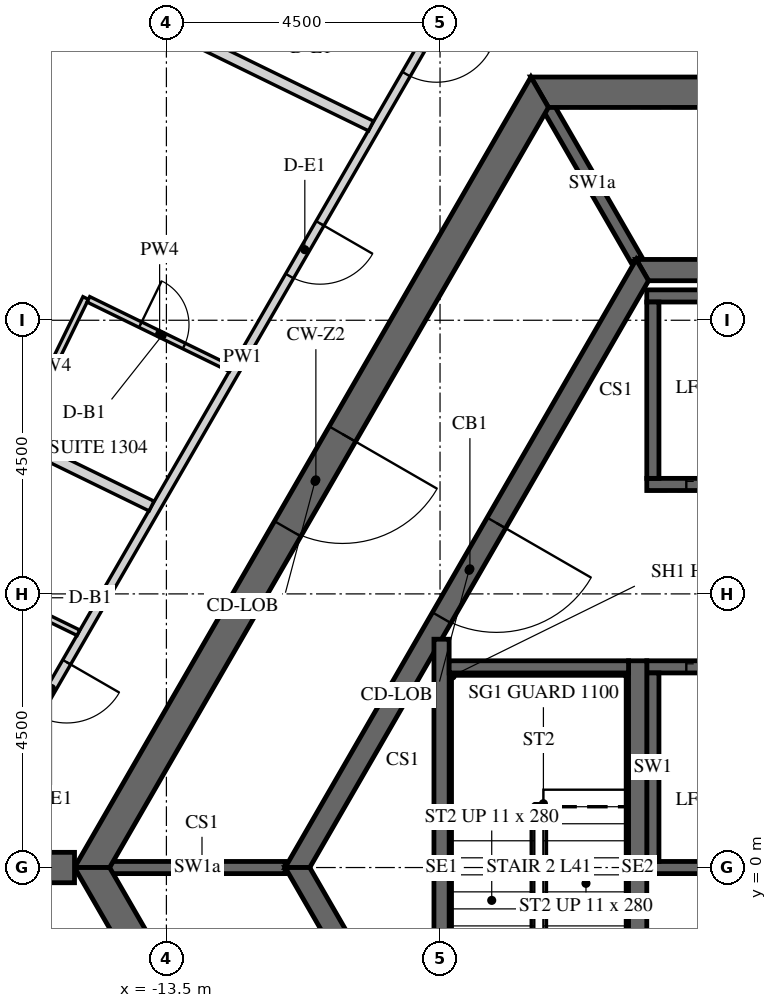
"""IFC4 building model, lengths in metres.
Left out: names, types, materials, properties, quantities, classifications, styles, units other than length and angle.
Written with IfcOpenShell. Run it as: python <this file> out.ifc"""

import sys

from ifc_helpers import new_model, si_unit, direction, frame, frame_2d, origin, place, context, subcontext, project, spatial, polyline, rectangle, outline, extrude, element, fill, save


model = new_model("IFC4")
c1 = context("Model", 3, precision=1e-05, world=origin(), true_north=direction((0.0, 1.0)))
c2 = subcontext(c1, "Body", "Model", "MODEL_VIEW")
j1 = project(units=[si_unit("LENGTHUNIT", "METRE"), si_unit("PLANEANGLEUNIT", "RADIAN")], contexts=[c1])
p1 = place(None, origin())
s1 = spatial("IfcSite", under=j1, at=p1, CompositionType="ELEMENT")
p2 = place(p1, origin())
s2 = spatial("IfcBuilding", under=s1, at=p2, CompositionType="ELEMENT")
p3 = place(p2, frame((0.0, 0.0, 176.1)))
s3 = spatial("IfcBuildingStorey", under=s2, at=p3, CompositionType="ELEMENT", Elevation=176.1)
p4 = place(p3, frame((-7.361, 12.75, -0.15), z_axis=(0.0, 0.0, 1.0), x_axis=(-0.50000571537, -0.866022103989, 0.0)))
e1 = element("IfcWall", 1, at=p4, inside=s3, PredefinedType="SHEAR", context=c2, shape_type="SweptSolid", body=[
    extrude(outline(polyline([(-0.144, -0.25), (14.867, -0.25), (14.578, 0.25), (0.144, 0.25), (-0.144, -0.25)])), origin(), (0.0, 0.0, 1.0), 3.9),
])
p5 = place(p4, frame((6.49, 0.0, 0.15)))
e2 = element("IfcOpeningElement", 2, at=p5, cuts=e1, PredefinedType="OPENING", context=c2, shape_type="SweptSolid", body=[
    extrude(rectangle(XDim=1.8, YDim=2.4, at=frame_2d((0.9, 1.2))), frame((0.0, 0.26, 0.0), z_axis=(0.0, -1.0, 0.0), x_axis=(1.0, 0.0, 0.0)), (0.0, 0.0, 1.0), 0.52),
])
p6 = place(p3, frame((-14.722, 0.0, -0.15), z_axis=(0.0, 0.0, 1.0), x_axis=(0.50000571537, -0.866022103989, 0.0)))
e3 = element("IfcWall", 3, at=p6, inside=s3, PredefinedType="SHEAR", context=c2, shape_type="SweptSolid", body=[
    extrude(outline(polyline([(-0.144, -0.25), (14.867, -0.25), (14.578, 0.25), (0.144, 0.25), (-0.144, -0.25)])), origin(), (0.0, 0.0, 1.0), 3.9),
])
p7 = place(p6, frame((6.432, 0.0, 0.15)))
e4 = element("IfcOpeningElement", 4, at=p7, cuts=e3, PredefinedType="OPENING", context=c2, shape_type="SweptSolid", body=[
    extrude(rectangle(XDim=1.8, YDim=2.4, at=frame_2d((0.9, 1.2))), frame((0.0, 0.26, 0.0), z_axis=(0.0, -1.0, 0.0), x_axis=(1.0, 0.0, 0.0)), (0.0, 0.0, 1.0), 0.52),
])
p8 = place(p3, frame((7.361, 12.75, -0.15), z_axis=(0.0, 0.0, 1.0), x_axis=(-1.0, 0.0, 0.0)))
e5 = element("IfcWall", 5, at=p8, inside=s3, PredefinedType="SHEAR", context=c2, shape_type="SweptSolid", body=[
    extrude(outline(polyline([(-0.144, -0.25), (14.866, -0.25), (14.578, 0.25), (0.144, 0.25), (-0.144, -0.25)])), origin(), (0.0, 0.0, 1.0), 3.9),
])
p9 = place(p8, frame((6.761, 0.0, 0.15)))
e6 = element("IfcOpeningElement", 6, at=p9, cuts=e5, PredefinedType="OPENING", context=c2, shape_type="SweptSolid", body=[
    extrude(rectangle(XDim=1.2, YDim=2.4, at=frame_2d((0.6, 1.2))), frame((0.0, 0.26, 0.0), z_axis=(0.0, -1.0, 0.0), x_axis=(1.0, 0.0, 0.0)), (0.0, 0.0, 1.0), 0.52),
])
p10 = place(p3, frame((-15.011, 0.0, -0.15), z_axis=(0.0, 0.0, 1.0), x_axis=(-1.0, 0.0, 0.0)))
e7 = element("IfcWall", 7, at=p10, inside=s3, PredefinedType="SHEAR", context=c2, shape_type="SweptSolid", body=[
    extrude(rectangle(XDim=15.424, YDim=0.5, at=frame_2d((7.712, 0.0))), origin(), (0.0, 0.0, 1.0), 3.9),
])
p11 = place(p10, frame((6.812, 0.0, 0.15)))
e8 = element("IfcOpeningElement", 8, at=p11, cuts=e7, PredefinedType="OPENING", context=c2, shape_type="SweptSolid", body=[
    extrude(rectangle(XDim=1.8, YDim=2.4, at=frame_2d((0.9, 1.2))), frame((0.0, 0.26, 0.0), z_axis=(0.0, -1.0, 0.0), x_axis=(1.0, 0.0, 0.0)), (0.0, 0.0, 1.0), 0.52),
])
p12 = place(p3, frame((-5.673, 9.825, -0.15), z_axis=(0.0, 0.0, 1.0), x_axis=(-0.499995046907, -0.866028263435, 0.0)))
e9 = element("IfcWall", 9, at=p12, inside=s3, PredefinedType="SHEAR", context=c2, shape_type="SweptSolid", body=[
    extrude(outline(polyline([(-0.101, -0.175), (11.446, -0.175), (11.244, 0.175), (0.101, 0.175), (-0.101, -0.175)])), origin(), (0.0, 0.0, 1.0), 3.9),
])
p13 = place(p12, frame((4.801, 0.0, 0.15)))
e10 = element("IfcOpeningElement", 10, at=p13, cuts=e9, PredefinedType="OPENING", context=c2, shape_type="SweptSolid", body=[
    extrude(rectangle(XDim=1.8, YDim=2.4, at=frame_2d((0.9, 1.2))), frame((0.0, 0.185, 0.0), z_axis=(0.0, -1.0, 0.0), x_axis=(1.0, 0.0, 0.0)), (0.0, 0.0, 1.0), 0.37),
])
p14 = place(p3, frame((-11.345, 0.0, -0.15), z_axis=(0.0, 0.0, 1.0), x_axis=(0.499995046907, -0.866028263435, 0.0)))
e11 = element("IfcWall", 11, at=p14, inside=s3, PredefinedType="SHEAR", context=c2, shape_type="SweptSolid", body=[
    extrude(outline(polyline([(-0.101, -0.175), (11.446, -0.175), (11.244, 0.175), (0.101, 0.175), (-0.101, -0.175)])), origin(), (0.0, 0.0, 1.0), 3.9),
])
p15 = place(p14, frame((4.744, 0.0, 0.15)))
e12 = element("IfcOpeningElement", 12, at=p15, cuts=e11, PredefinedType="OPENING", context=c2, shape_type="SweptSolid", body=[
    extrude(rectangle(XDim=1.8, YDim=2.4, at=frame_2d((0.9, 1.2))), frame((0.0, 0.185, 0.0), z_axis=(0.0, -1.0, 0.0), x_axis=(1.0, 0.0, 0.0)), (0.0, 0.0, 1.0), 0.37),
])
p16 = place(p3, frame((5.673, 9.825, -0.15), z_axis=(0.0, 0.0, 1.0), x_axis=(-1.0, 0.0, 0.0)))
e13 = element("IfcWall", 13, at=p16, inside=s3, PredefinedType="SHEAR", context=c2, shape_type="SweptSolid", body=[
    extrude(outline(polyline([(-0.101, -0.175), (11.446, -0.175), (11.244, 0.175), (0.101, 0.175), (-0.101, -0.175)])), origin(), (0.0, 0.0, 1.0), 3.9),
])
p17 = place(p3, frame((-5.6, 6.3, -0.25), z_axis=(0.0, 0.0, 1.0), x_axis=(1.0, 0.0, 0.0)))
e14 = element("IfcWall", 14, at=p17, inside=s3, PredefinedType="SHEAR", context=c2, shape_type="SweptSolid", body=[
    extrude(rectangle(XDim=11.2, YDim=0.2, at=frame_2d((5.6, 0.0))), origin(), (0.0, 0.0, 1.0), 3.9),
])
p18 = place(p17, frame((8.45, 0.0, 0.25)))
e15 = element("IfcOpeningElement", 15, at=p18, cuts=e14, PredefinedType="OPENING", context=c2, shape_type="SweptSolid", body=[
    extrude(rectangle(XDim=0.9, YDim=2.1, at=frame_2d((0.45, 1.05))), frame((0.0, 0.11, 0.0), z_axis=(0.0, -1.0, 0.0), x_axis=(1.0, 0.0, 0.0)), (0.0, 0.0, 1.0), 0.22),
])
p19 = place(p17, frame((0.65, 0.0, 0.25)))
e16 = element("IfcOpeningElement", 16, at=p19, cuts=e14, PredefinedType="OPENING", context=c2, shape_type="SweptSolid", body=[
    extrude(rectangle(XDim=1.1, YDim=2.1, at=frame_2d((0.55, 1.05))), frame((0.0, 0.11, 0.0), z_axis=(0.0, -1.0, 0.0), x_axis=(1.0, 0.0, 0.0)), (0.0, 0.0, 1.0), 0.22),
])
p20 = place(p17, frame((2.85, 0.0, 0.25)))
e17 = element("IfcOpeningElement", 17, at=p20, cuts=e14, PredefinedType="OPENING", context=c2, shape_type="SweptSolid", body=[
    extrude(rectangle(XDim=1.1, YDim=2.1, at=frame_2d((0.55, 1.05))), frame((0.0, 0.11, 0.0), z_axis=(0.0, -1.0, 0.0), x_axis=(1.0, 0.0, 0.0)), (0.0, 0.0, 1.0), 0.22),
])
p21 = place(p17, frame((5.05, 0.0, 0.25)))
e18 = element("IfcOpeningElement", 18, at=p21, cuts=e14, PredefinedType="OPENING", context=c2, shape_type="SweptSolid", body=[
    extrude(rectangle(XDim=1.1, YDim=2.1, at=frame_2d((0.55, 1.05))), frame((0.0, 0.11, 0.0), z_axis=(0.0, -1.0, 0.0), x_axis=(1.0, 0.0, 0.0)), (0.0, 0.0, 1.0), 0.22),
])
p22 = place(p3, frame((-5.6, 9.4, -0.25), z_axis=(0.0, 0.0, 1.0), x_axis=(1.0, 0.0, 0.0)))
e19 = element("IfcWall", 19, at=p22, inside=s3, PredefinedType="SHEAR", context=c2, shape_type="SweptSolid", body=[
    extrude(rectangle(XDim=11.2, YDim=0.2, at=frame_2d((5.6, 0.0))), origin(), (0.0, 0.0, 1.0), 3.9),
])
p23 = place(p3, frame((-5.5, 6.4, -0.25), z_axis=(0.0, 0.0, 1.0), x_axis=(0.0, 1.0, 0.0)))
e20 = element("IfcWall", 20, at=p23, inside=s3, PredefinedType="SHEAR", context=c2, shape_type="SweptSolid", body=[
    extrude(rectangle(XDim=2.9, YDim=0.2, at=frame_2d((1.45, 0.0))), origin(), (0.0, 0.0, 1.0), 3.9),
])
p24 = place(p3, frame((-5.6, 3.3, -0.25), z_axis=(0.0, 0.0, 1.0), x_axis=(1.0, 0.0, 0.0)))
e21 = element("IfcWall", 21, at=p24, inside=s3, PredefinedType="SHEAR", context=c2, shape_type="SweptSolid", body=[
    extrude(rectangle(XDim=11.2, YDim=0.2, at=frame_2d((5.6, 0.0))), origin(), (0.0, 0.0, 1.0), 3.9),
])
p25 = place(p24, frame((0.65, 0.0, 0.25)))
e22 = element("IfcOpeningElement", 22, at=p25, cuts=e21, PredefinedType="OPENING", context=c2, shape_type="SweptSolid", body=[
    extrude(rectangle(XDim=1.1, YDim=2.1, at=frame_2d((0.55, 1.05))), frame((0.0, 0.11, 0.0), z_axis=(0.0, -1.0, 0.0), x_axis=(1.0, 0.0, 0.0)), (0.0, 0.0, 1.0), 0.22),
])
p26 = place(p24, frame((2.85, 0.0, 0.25)))
e23 = element("IfcOpeningElement", 23, at=p26, cuts=e21, PredefinedType="OPENING", context=c2, shape_type="SweptSolid", body=[
    extrude(rectangle(XDim=1.1, YDim=2.1, at=frame_2d((0.55, 1.05))), frame((0.0, 0.11, 0.0), z_axis=(0.0, -1.0, 0.0), x_axis=(1.0, 0.0, 0.0)), (0.0, 0.0, 1.0), 0.22),
])
p27 = place(p24, frame((5.05, 0.0, 0.25)))
e24 = element("IfcOpeningElement", 24, at=p27, cuts=e21, PredefinedType="OPENING", context=c2, shape_type="SweptSolid", body=[
    extrude(rectangle(XDim=1.1, YDim=2.1, at=frame_2d((0.55, 1.05))), frame((0.0, 0.11, 0.0), z_axis=(0.0, -1.0, 0.0), x_axis=(1.0, 0.0, 0.0)), (0.0, 0.0, 1.0), 0.22),
])
p28 = place(p24, frame((7.25, 0.0, 0.25)))
e25 = element("IfcOpeningElement", 25, at=p28, cuts=e21, PredefinedType="OPENING", context=c2, shape_type="SweptSolid", body=[
    extrude(rectangle(XDim=1.1, YDim=2.1, at=frame_2d((0.55, 1.05))), frame((0.0, 0.11, 0.0), z_axis=(0.0, -1.0, 0.0), x_axis=(1.0, 0.0, 0.0)), (0.0, 0.0, 1.0), 0.22),
])
p29 = place(p24, frame((9.45, 0.0, 0.25)))
e26 = element("IfcOpeningElement", 26, at=p29, cuts=e21, PredefinedType="OPENING", context=c2, shape_type="SweptSolid", body=[
    extrude(rectangle(XDim=1.1, YDim=2.1, at=frame_2d((0.55, 1.05))), frame((0.0, 0.11, 0.0), z_axis=(0.0, -1.0, 0.0), x_axis=(1.0, 0.0, 0.0)), (0.0, 0.0, 1.0), 0.22),
])
p30 = place(p3, frame((-5.6, 0.0, -0.25), z_axis=(0.0, 0.0, 1.0), x_axis=(1.0, 0.0, 0.0)))
e27 = element("IfcWall", 27, at=p30, inside=s3, PredefinedType="SHEAR", context=c2, shape_type="SweptSolid", body=[
    extrude(rectangle(XDim=11.2, YDim=0.2, at=frame_2d((5.6, 0.0))), origin(), (0.0, 0.0, 1.0), 3.9),
])
p31 = place(p3, frame((-5.5, 0.1, -0.25), z_axis=(0.0, 0.0, 1.0), x_axis=(0.0, 1.0, 0.0)))
e28 = element("IfcWall", 28, at=p31, inside=s3, PredefinedType="SHEAR", context=c2, shape_type="SweptSolid", body=[
    extrude(rectangle(XDim=3.1, YDim=0.2, at=frame_2d((1.55, 0.0))), origin(), (0.0, 0.0, 1.0), 3.9),
])
for number, where, z_axis, x_axis in (
    (29, (-5.773, 10.0, -0.15), (0.0, 0.0, 1.0), (-0.5, 0.866, 0.0)),
    (30, (-11.547, 0.0, -0.15), (0.0, 0.0, 1.0), (-1.0, 0.0, 0.0)),
):
    element("IfcWall", number, at=place(p3, frame(where, z_axis=z_axis, x_axis=x_axis)), inside=s3, PredefinedType="SHEAR", context=c2, shape_type="SweptSolid", body=[
        extrude(rectangle(XDim=2.887, YDim=0.2, at=frame_2d((1.443, 0.0))), origin(), (0.0, 0.0, 1.0), 3.9),
    ])
p32 = place(p3, frame((-5.75, -3.4, -0.25), z_axis=(0.0, 0.0, 1.0), x_axis=(0.0, 1.0, 0.0)))
e31 = element("IfcWall", 31, at=p32, inside=s3, PredefinedType="SHEAR", context=c2, shape_type="SweptSolid", body=[
    extrude(rectangle(XDim=6.8, YDim=0.3, at=frame_2d((3.4, 0.0))), origin(), (0.0, 0.0, 1.0), 3.9),
])
p33 = place(p3, frame((-8.975, -3.755, -0.25), z_axis=(0.0, 0.0, 1.0), x_axis=(0.0, 1.0, 0.0)))
e32 = element("IfcWall", 32, at=p33, inside=s3, PredefinedType="SHEAR", context=c2, shape_type="SweptSolid", body=[
    extrude(rectangle(XDim=7.51, YDim=0.25, at=frame_2d((3.755, 0.0))), origin(), (0.0, 0.0, 1.0), 3.9),
])
p34 = place(p3, frame((-8.85, 3.3, -0.25), z_axis=(0.0, 0.0, 1.0), x_axis=(1.0, 0.0, 0.0)))
e33 = element("IfcWall", 33, at=p34, inside=s3, PredefinedType="SHEAR", context=c2, shape_type="SweptSolid", body=[
    extrude(rectangle(XDim=2.95, YDim=0.2, at=frame_2d((1.475, 0.0))), origin(), (0.0, 0.0, 1.0), 3.9),
])
p35 = place(p3, frame((-8.588, 14.725, 0.0), z_axis=(0.0, 0.0, 1.0), x_axis=(-0.499996322767, -0.866027526826, 0.0)))
e34 = element("IfcWall", 34, at=p35, inside=s3, PredefinedType="PARTITIONING", context=c2, shape_type="SweptSolid", body=[
    extrude(rectangle(XDim=14.636, YDim=0.15, at=frame_2d((7.318, 0.0))), origin(), (0.0, 0.0, 1.0), 2.988),
])
p36 = place(p35, frame((0.936, 0.0, 0.0)))
e35 = element("IfcOpeningElement", 35, at=p36, cuts=e34, PredefinedType="OPENING", context=c2, shape_type="SweptSolid", body=[
    extrude(rectangle(XDim=1.0, YDim=2.1, at=frame_2d((0.5, 1.05))), frame((0.0, 0.085, 0.0), z_axis=(0.0, -1.0, 0.0), x_axis=(1.0, 0.0, 0.0)), (0.0, 0.0, 1.0), 0.17),
])
p37 = place(p35, frame((4.771, 0.0, 0.0)))
e36 = element("IfcOpeningElement", 36, at=p37, cuts=e34, PredefinedType="OPENING", context=c2, shape_type="SweptSolid", body=[
    extrude(rectangle(XDim=1.0, YDim=2.1, at=frame_2d((0.5, 1.05))), frame((0.0, 0.085, 0.0), z_axis=(0.0, -1.0, 0.0), x_axis=(1.0, 0.0, 0.0)), (0.0, 0.0, 1.0), 0.17),
])
p38 = place(p35, frame((13.103, 0.0, 0.0)))
e37 = element("IfcOpeningElement", 37, at=p38, cuts=e34, PredefinedType="OPENING", context=c2, shape_type="SweptSolid", body=[
    extrude(rectangle(XDim=1.0, YDim=2.1, at=frame_2d((0.5, 1.05))), frame((0.0, 0.085, 0.0), z_axis=(0.0, -1.0, 0.0), x_axis=(1.0, 0.0, 0.0)), (0.0, 0.0, 1.0), 0.17),
])
p39 = place(p3, frame((-21.815, 17.892, 0.0), z_axis=(0.0, 0.0, 1.0), x_axis=(0.898798778742, -0.43836144371, 0.0)))
e38 = element("IfcWall", 38, at=p39, inside=s3, PredefinedType="PARTITIONING", context=c2, shape_type="SweptSolid", body=[
    extrude(rectangle(XDim=12.994, YDim=0.18, at=frame_2d((6.497, 0.0))), origin(), (0.0, 0.0, 1.0), 2.988),
])
p40 = place(p3, frame((-15.927, 7.11, 0.0), z_axis=(0.0, 0.0, 1.0), x_axis=(0.438398718232, 0.898780598284, 0.0)))
e39 = element("IfcWall", 39, at=p40, inside=s3, PredefinedType="PARTITIONING", context=c2, shape_type="SweptSolid", body=[
    extrude(rectangle(XDim=2.51, YDim=0.1, at=frame_2d((1.255, 0.0))), origin(), (0.0, 0.0, 1.0), 2.988),
])
p41 = place(p3, frame((-14.782, 9.344, 0.0), z_axis=(0.0, 0.0, 1.0), x_axis=(0.898770247069, -0.438419939081, 0.0)))
e40 = element("IfcWall", 40, at=p41, inside=s3, PredefinedType="PARTITIONING", context=c2, shape_type="SweptSolid", body=[
    extrude(rectangle(XDim=2.605, YDim=0.1, at=frame_2d((1.302, 0.0))), origin(), (0.0, 0.0, 1.0), 2.988),
])
p42 = place(p41, frame((0.95, 0.0, 0.0)))
e41 = element("IfcOpeningElement", 41, at=p42, cuts=e40, PredefinedType="OPENING", context=c2, shape_type="SweptSolid", body=[
    extrude(rectangle(XDim=0.8, YDim=2.1, at=frame_2d((0.4, 1.05))), frame((0.0, 0.06, 0.0), z_axis=(0.0, -1.0, 0.0), x_axis=(1.0, 0.0, 0.0)), (0.0, 0.0, 1.0), 0.12),
])
p43 = place(p3, frame((-24.971, 11.42, 0.0), z_axis=(0.0, 0.0, 1.0), x_axis=(0.898796996421, -0.438365098091, 0.0)))
e42 = element("IfcWall", 42, at=p43, inside=s3, PredefinedType="PARTITIONING", context=c2, shape_type="SweptSolid", body=[
    extrude(rectangle(XDim=12.491, YDim=0.18, at=frame_2d((6.246, 0.0))), origin(), (0.0, 0.0, 1.0), 2.988),
])
p44 = place(p3, frame((-14.947, 3.861, 0.0), z_axis=(0.0, 0.0, 1.0), x_axis=(-0.898811693159, 0.438334963517, 0.0)))
e43 = element("IfcWall", 43, at=p44, inside=s3, PredefinedType="PARTITIONING", context=c2, shape_type="SweptSolid", body=[
    extrude(rectangle(XDim=2.712, YDim=0.1, at=frame_2d((1.356, 0.0))), origin(), (0.0, 0.0, 1.0), 2.988),
])
p45 = place(p44, frame((0.913, 0.0, 0.0)))
e44 = element("IfcOpeningElement", 44, at=p45, cuts=e43, PredefinedType="OPENING", context=c2, shape_type="SweptSolid", body=[
    extrude(rectangle(XDim=0.8, YDim=2.1, at=frame_2d((0.4, 1.05))), frame((0.0, 0.06, 0.0), z_axis=(0.0, -1.0, 0.0), x_axis=(1.0, 0.0, 0.0)), (0.0, 0.0, 1.0), 0.12),
])
p46 = place(p5, origin())
e45 = element("IfcDoor", 45, at=p46, inside=s3, OperationType="DOUBLE_DOOR_SINGLE_SWING", PredefinedType="DOOR", context=c2, shape_type="SweptSolid", body=[
    extrude(rectangle(XDim=1.8, YDim=2.4, at=frame_2d((0.9, 1.2))), frame((0.0, 0.025, 0.0), z_axis=(0.0, -1.0, 0.0), x_axis=(1.0, 0.0, 0.0)), (0.0, 0.0, 1.0), 0.05),
])
fill(e2, e45)
p47 = place(p13, origin())
e46 = element("IfcDoor", 46, at=p47, inside=s3, OperationType="DOUBLE_DOOR_SINGLE_SWING", PredefinedType="DOOR", context=c2, shape_type="SweptSolid", body=[
    extrude(rectangle(XDim=1.8, YDim=2.4, at=frame_2d((0.9, 1.2))), frame((0.0, 0.025, 0.0), z_axis=(0.0, -1.0, 0.0), x_axis=(1.0, 0.0, 0.0)), (0.0, 0.0, 1.0), 0.05),
])
fill(e10, e46)
p48 = place(p19, origin())
e47 = element("IfcDoor", 47, at=p48, inside=s3, OperationType="SLIDING_TO_LEFT", PredefinedType="DOOR", context=c2, shape_type="SweptSolid", body=[
    extrude(rectangle(XDim=1.1, YDim=2.1, at=frame_2d((0.55, 1.05))), frame((0.0, 0.025, 0.0), z_axis=(0.0, -1.0, 0.0), x_axis=(1.0, 0.0, 0.0)), (0.0, 0.0, 1.0), 0.05),
])
fill(e16, e47)
p49 = place(p25, origin())
e48 = element("IfcDoor", 48, at=p49, inside=s3, OperationType="SLIDING_TO_LEFT", PredefinedType="DOOR", context=c2, shape_type="SweptSolid", body=[
    extrude(rectangle(XDim=1.1, YDim=2.1, at=frame_2d((0.55, 1.05))), frame((0.0, 0.025, 0.0), z_axis=(0.0, -1.0, 0.0), x_axis=(1.0, 0.0, 0.0)), (0.0, 0.0, 1.0), 0.05),
])
fill(e22, e48)
p50 = place(p36, origin())
e49 = element("IfcDoor", 49, at=p50, inside=s3, OperationType="SINGLE_SWING_RIGHT", PredefinedType="DOOR", context=c2, shape_type="SweptSolid", body=[
    extrude(rectangle(XDim=1.0, YDim=2.1, at=frame_2d((0.5, 1.05))), frame((0.0, 0.025, 0.0), z_axis=(0.0, -1.0, 0.0), x_axis=(1.0, 0.0, 0.0)), (0.0, 0.0, 1.0), 0.05),
])
fill(e35, e49)
p51 = place(p37, origin())
e50 = element("IfcDoor", 50, at=p51, inside=s3, OperationType="SINGLE_SWING_LEFT", PredefinedType="DOOR", context=c2, shape_type="SweptSolid", body=[
    extrude(rectangle(XDim=1.0, YDim=2.1, at=frame_2d((0.5, 1.05))), frame((0.0, 0.025, 0.0), z_axis=(0.0, -1.0, 0.0), x_axis=(1.0, 0.0, 0.0)), (0.0, 0.0, 1.0), 0.05),
])
fill(e36, e50)
p52 = place(p42, origin())
e51 = element("IfcDoor", 51, at=p52, inside=s3, OperationType="SINGLE_SWING_LEFT", PredefinedType="DOOR", context=c2, shape_type="SweptSolid", body=[
    extrude(rectangle(XDim=0.8, YDim=2.1, at=frame_2d((0.4, 1.05))), frame((0.0, 0.025, 0.0), z_axis=(0.0, -1.0, 0.0), x_axis=(1.0, 0.0, 0.0)), (0.0, 0.0, 1.0), 0.05),
])
fill(e41, e51)
p53 = place(p38, origin())
e52 = element("IfcDoor", 52, at=p53, inside=s3, OperationType="SINGLE_SWING_LEFT", PredefinedType="DOOR", context=c2, shape_type="SweptSolid", body=[
    extrude(rectangle(XDim=1.0, YDim=2.1, at=frame_2d((0.5, 1.05))), frame((0.0, 0.025, 0.0), z_axis=(0.0, -1.0, 0.0), x_axis=(1.0, 0.0, 0.0)), (0.0, 0.0, 1.0), 0.05),
])
fill(e37, e52)
save(model, sys.argv[1])
